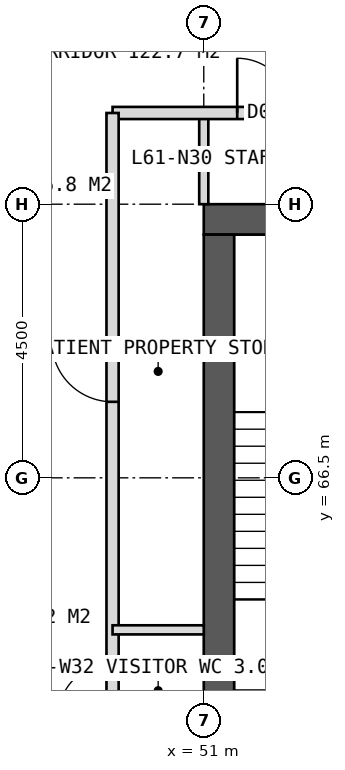
"""IFC4 building model, lengths in metres.
Left out: names, types, materials, properties, quantities, classifications, styles, units other than length and angle.
Written with IfcOpenShell. Run it as: python <this file> out.ifc"""

import sys

from ifc_helpers import new_model, si_unit, direction, frame, frame_2d, origin, place, context, subcontext, project, spatial, rectangle, extrude, element, fill, save


model = new_model("IFC4")
c1 = context("Model", 3, precision=1e-05, world=origin(), true_north=direction((0.0, 1.0)))
c2 = subcontext(c1, "Body", "Model", "MODEL_VIEW")
j1 = project(units=[si_unit("LENGTHUNIT", "METRE"), si_unit("PLANEANGLEUNIT", "RADIAN")], contexts=[c1])
p1 = place(None, origin())
s1 = spatial("IfcSite", under=j1, at=p1, CompositionType="ELEMENT")
p2 = place(p1, origin())
s2 = spatial("IfcBuilding", under=s1, at=p2, CompositionType="ELEMENT")
p3 = place(p2, frame((0.0, 0.0, 254.0)))
s3 = spatial("IfcBuildingStorey", under=s2, at=p3, CompositionType="ELEMENT", Elevation=254.0)
p4 = place(p3, frame((51.0, 70.75, 0.0), z_axis=(0.0, 0.0, 1.0), x_axis=(1.0, 0.0, 0.0)))
e1 = element("IfcWall", 1, at=p4, inside=s3, PredefinedType="SHEAR", context=c2, shape_type="SweptSolid", body=[
    extrude(rectangle(XDim=18.0, YDim=0.5, at=frame_2d((9.0, 0.0))), origin(), (0.0, 0.0, 1.0), 4.0),
])
p5 = place(p4, frame((8.1, 0.0, 0.0)))
e2 = element("IfcOpeningElement", 2, at=p5, cuts=e1, PredefinedType="OPENING", context=c2, shape_type="SweptSolid", body=[
    extrude(rectangle(XDim=1.8, YDim=2.2, at=frame_2d((0.9, 1.1))), frame((0.0, 0.26, 0.0), z_axis=(0.0, -1.0, 0.0), x_axis=(1.0, 0.0, 0.0)), (0.0, 0.0, 1.0), 0.52),
])
p6 = place(p3, frame((51.25, 53.5, 0.0), z_axis=(0.0, 0.0, 1.0), x_axis=(0.0, 1.0, 0.0)))
e3 = element("IfcWall", 3, at=p6, inside=s3, PredefinedType="SHEAR", context=c2, shape_type="SweptSolid", body=[
    extrude(rectangle(XDim=17.0, YDim=0.5, at=frame_2d((8.5, 0.0))), origin(), (0.0, 0.0, 1.0), 4.0),
])
p7 = place(p6, frame((6.1, 0.0, 0.0)))
e4 = element("IfcOpeningElement", 4, at=p7, cuts=e3, PredefinedType="OPENING", context=c2, shape_type="SweptSolid", body=[
    extrude(rectangle(XDim=1.5, YDim=2.2, at=frame_2d((0.75, 1.1))), frame((0.0, 0.26, 0.0), z_axis=(0.0, -1.0, 0.0), x_axis=(1.0, 0.0, 0.0)), (0.0, 0.0, 1.0), 0.52),
])
p8 = place(p3, frame((51.5, 62.85, 0.0), z_axis=(0.0, 0.0, 1.0), x_axis=(1.0, 0.0, 0.0)))
e5 = element("IfcWall", 5, at=p8, inside=s3, PredefinedType="SHEAR", context=c2, shape_type="SweptSolid", body=[
    extrude(rectangle(XDim=3.3, YDim=0.3, at=frame_2d((1.65, 0.0))), origin(), (0.0, 0.0, 1.0), 4.0),
])
p9 = place(p8, frame((1.15, 0.0, 0.0)))
e6 = element("IfcOpeningElement", 6, at=p9, cuts=e5, PredefinedType="OPENING", context=c2, shape_type="SweptSolid", body=[
    extrude(rectangle(XDim=1.2, YDim=2.1, at=frame_2d((0.6, 1.05))), frame((0.0, 0.16, 0.0), z_axis=(0.0, -1.0, 0.0), x_axis=(1.0, 0.0, 0.0)), (0.0, 0.0, 1.0), 0.32),
])
p10 = place(p3, frame((51.0, 71.0, 0.0), z_axis=(0.0, 0.0, 1.0), x_axis=(0.0, 1.0, 0.0)))
e7 = element("IfcWall", 7, at=p10, inside=s3, PredefinedType="PARTITIONING", context=c2, shape_type="SweptSolid", body=[
    extrude(rectangle(XDim=1.5, YDim=0.15, at=frame_2d((0.75, 0.0))), origin(), (0.0, 0.0, 1.0), 3.75),
])
p11 = place(p3, frame((49.5, 72.5, 0.0), z_axis=(0.0, 0.0, 1.0), x_axis=(1.0, 0.0, 0.0)))
e8 = element("IfcWall", 8, at=p11, inside=s3, PredefinedType="PARTITIONING", context=c2, shape_type="SweptSolid", body=[
    extrude(rectangle(XDim=8.25, YDim=0.2, at=frame_2d((4.125, 0.0))), origin(), (0.0, 0.0, 1.0), 3.75),
])
p12 = place(p11, frame((2.05, 0.0, 0.0)))
e9 = element("IfcOpeningElement", 9, at=p12, cuts=e8, PredefinedType="OPENING", context=c2, shape_type="SweptSolid", body=[
    extrude(rectangle(XDim=0.9, YDim=2.1, at=frame_2d((0.45, 1.05))), frame((0.0, 0.11, 0.0), z_axis=(0.0, -1.0, 0.0), x_axis=(1.0, 0.0, 0.0)), (0.0, 0.0, 1.0), 0.22),
])
p13 = place(p11, frame((5.375, 0.0, 0.0)))
e10 = element("IfcOpeningElement", 10, at=p13, cuts=e8, PredefinedType="OPENING", context=c2, shape_type="SweptSolid", body=[
    extrude(rectangle(XDim=1.0, YDim=2.1, at=frame_2d((0.5, 1.05))), frame((0.0, 0.11, 0.0), z_axis=(0.0, -1.0, 0.0), x_axis=(1.0, 0.0, 0.0)), (0.0, 0.0, 1.0), 0.22),
])
p14 = place(p3, frame((49.5, 62.0, 0.0), z_axis=(0.0, 0.0, 1.0), x_axis=(0.0, 1.0, 0.0)))
e11 = element("IfcWall", 11, at=p14, inside=s3, PredefinedType="PARTITIONING", context=c2, shape_type="SweptSolid", body=[
    extrude(rectangle(XDim=10.5, YDim=0.2, at=frame_2d((5.25, 0.0))), origin(), (0.0, 0.0, 1.0), 3.75),
])
p15 = place(p14, frame((0.55, 0.0, 0.0)))
e12 = element("IfcOpeningElement", 12, at=p15, cuts=e11, PredefinedType="OPENING", context=c2, shape_type="SweptSolid", body=[
    extrude(rectangle(XDim=0.9, YDim=2.1, at=frame_2d((0.45, 1.05))), frame((0.0, 0.11, 0.0), z_axis=(0.0, -1.0, 0.0), x_axis=(1.0, 0.0, 0.0)), (0.0, 0.0, 1.0), 0.22),
])
p16 = place(p14, frame((5.75, 0.0, 0.0)))
e13 = element("IfcOpeningElement", 13, at=p16, cuts=e11, PredefinedType="OPENING", context=c2, shape_type="SweptSolid", body=[
    extrude(rectangle(XDim=1.0, YDim=2.1, at=frame_2d((0.5, 1.05))), frame((0.0, 0.11, 0.0), z_axis=(0.0, -1.0, 0.0), x_axis=(1.0, 0.0, 0.0)), (0.0, 0.0, 1.0), 0.22),
])
p17 = place(p3, frame((51.0, 64.0, 0.0), z_axis=(0.0, 0.0, 1.0), x_axis=(-1.0, 0.0, 0.0)))
e14 = element("IfcWall", 14, at=p17, inside=s3, PredefinedType="PARTITIONING", context=c2, shape_type="SweptSolid", body=[
    extrude(rectangle(XDim=1.5, YDim=0.15, at=frame_2d((0.75, 0.0))), origin(), (0.0, 0.0, 1.0), 3.75),
])
p18 = place(p12, origin())
e15 = element("IfcDoor", 15, at=p18, inside=s3, OperationType="SINGLE_SWING_LEFT", PredefinedType="DOOR", context=c2, shape_type="SweptSolid", body=[
    extrude(rectangle(XDim=0.9, YDim=2.1, at=frame_2d((0.45, 1.05))), frame((0.0, 0.025, 0.0), z_axis=(0.0, -1.0, 0.0), x_axis=(1.0, 0.0, 0.0)), (0.0, 0.0, 1.0), 0.05),
])
fill(e9, e15)
p19 = place(p15, origin())
e16 = element("IfcDoor", 16, at=p19, inside=s3, OperationType="SINGLE_SWING_LEFT", PredefinedType="DOOR", context=c2, shape_type="SweptSolid", body=[
    extrude(rectangle(XDim=0.9, YDim=2.1, at=frame_2d((0.45, 1.05))), frame((0.0, 0.025, 0.0), z_axis=(0.0, -1.0, 0.0), x_axis=(1.0, 0.0, 0.0)), (0.0, 0.0, 1.0), 0.05),
])
fill(e12, e16)
p20 = place(p16, origin())
e17 = element("IfcDoor", 17, at=p20, inside=s3, OperationType="SINGLE_SWING_RIGHT", PredefinedType="DOOR", context=c2, shape_type="SweptSolid", body=[
    extrude(rectangle(XDim=1.0, YDim=2.1, at=frame_2d((0.5, 1.05))), frame((0.0, 0.025, 0.0), z_axis=(0.0, -1.0, 0.0), x_axis=(1.0, 0.0, 0.0)), (0.0, 0.0, 1.0), 0.05),
])
fill(e13, e17)
save(model, sys.argv[1])
